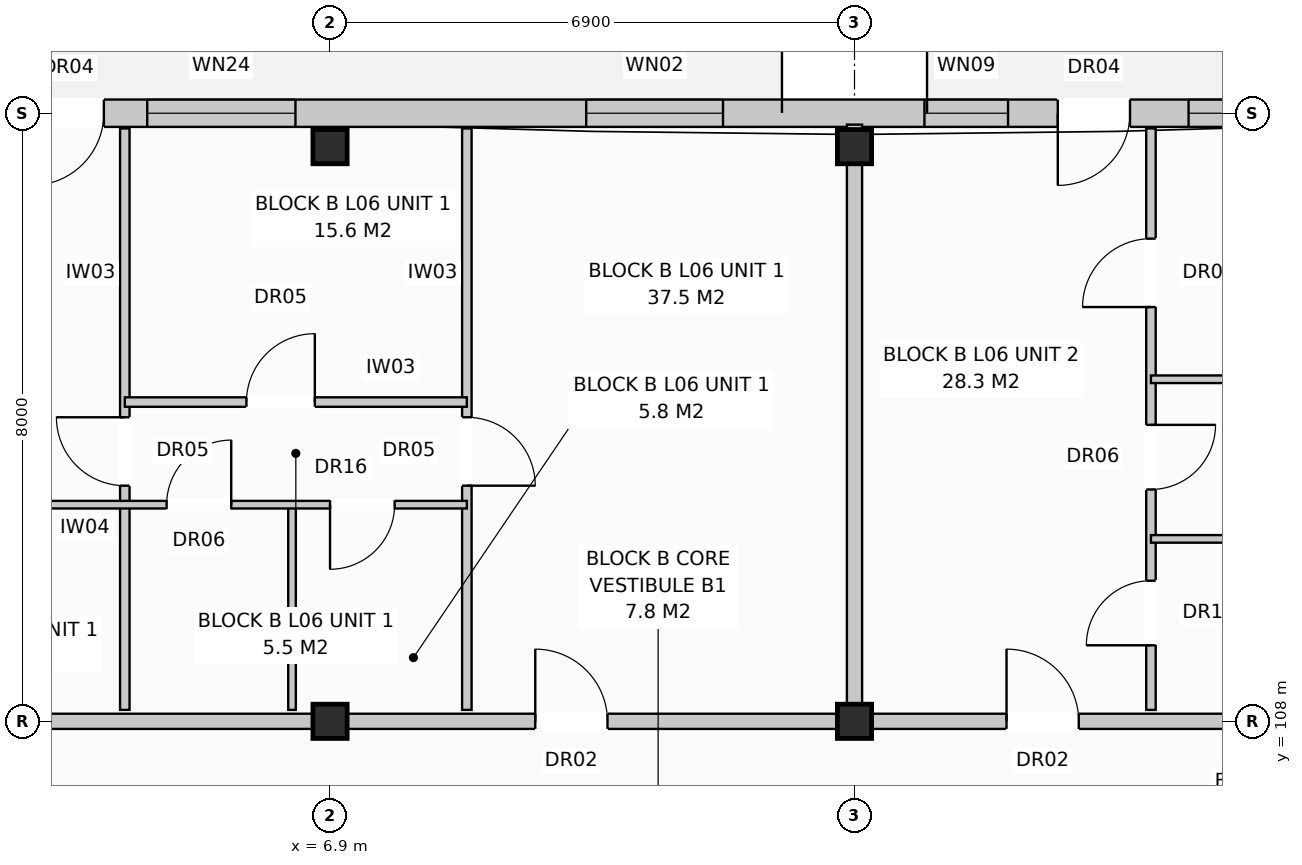
"""IFC4 building model, lengths in metres.
Left out: names, types, materials, properties, quantities, classifications, styles, units other than length and angle.
Written with IfcOpenShell. Run it as: python <this file> out.ifc"""

import sys

from ifc_helpers import new_model, si_unit, direction, frame, frame_2d, origin, origin_with_axes, origin_2d, place, context, subcontext, project, spatial, rectangle, extrude, element, fill, save


model = new_model("IFC4")
c1 = context("Model", 3, precision=1e-05, world=origin(), true_north=direction((0.0, 1.0)))
c2 = subcontext(c1, "Body", "Model", "MODEL_VIEW")
j1 = project(units=[si_unit("LENGTHUNIT", "METRE"), si_unit("PLANEANGLEUNIT", "RADIAN")], contexts=[c1])
p1 = place(None, origin())
s1 = spatial("IfcSite", under=j1, at=p1, CompositionType="ELEMENT")
p2 = place(p1, origin())
s2 = spatial("IfcBuilding", under=s1, at=p2, CompositionType="ELEMENT")
p3 = place(p2, frame((0.0, 0.0, 20.8)))
s3 = spatial("IfcBuildingStorey", under=s2, at=p3, CompositionType="ELEMENT", Elevation=20.8)
for number, where, z_axis, x_axis in (
    (1, (6.9, 108.0, 0.0), (0.0, 0.0, 1.0), (1.0, 0.0, 0.0)),
    (2, (6.9, 115.56, 0.0), (0.0, 0.0, 1.0), (1.0, 0.0, 0.0)),
    (3, (13.8, 108.0, 0.0), (0.0, 0.0, 1.0), (1.0, 0.0, 0.0)),
    (4, (13.8, 115.56, 0.0), (0.0, 0.0, 1.0), (1.0, 0.0, 0.0)),
):
    element("IfcColumn", number, at=place(p3, frame(where, z_axis=z_axis, x_axis=x_axis)), inside=s3, PredefinedType="COLUMN", context=c2, shape_type="SweptSolid", body=[
        extrude(rectangle(XDim=0.45, YDim=0.45, at=origin_2d()), origin(), (0.0, 0.0, 1.0), 3.2),
    ])
p4 = place(p3, frame((0.17, 116.0, 0.0), z_axis=(0.0, 0.0, 1.0), x_axis=(1.0, 0.0, 0.0)))
e5 = element("IfcWall", 5, at=p4, inside=s3, PredefinedType="STANDARD", context=c2, shape_type="SweptSolid", body=[
    extrude(rectangle(XDim=54.86, YDim=0.36, at=frame_2d((27.43, 0.0))), origin(), (0.0, 0.0, 1.0), 2.95),
])
p5 = place(p4, frame((2.804, 0.0, 0.0)))
e6 = element("IfcOpeningElement", 6, at=p5, cuts=e5, PredefinedType="OPENING", context=c2, shape_type="SweptSolid", body=[
    extrude(rectangle(XDim=0.95, YDim=2.1, at=frame_2d((0.475, 1.05))), frame((0.0, 0.192, 0.0), z_axis=(0.0, -1.0, 0.0), x_axis=(1.0, 0.0, 0.0)), (0.0, 0.0, 1.0), 0.384),
])
p6 = place(p4, frame((16.304, 0.0, 0.0)))
e7 = element("IfcOpeningElement", 7, at=p6, cuts=e5, PredefinedType="OPENING", context=c2, shape_type="SweptSolid", body=[
    extrude(rectangle(XDim=0.95, YDim=2.1, at=frame_2d((0.475, 1.05))), frame((0.0, 0.192, 0.0), z_axis=(0.0, -1.0, 0.0), x_axis=(1.0, 0.0, 0.0)), (0.0, 0.0, 1.0), 0.384),
])
p7 = place(p4, frame((30.804, 0.0, 0.0)))
e8 = element("IfcOpeningElement", 8, at=p7, cuts=e5, PredefinedType="OPENING", context=c2, shape_type="SweptSolid", body=[
    extrude(rectangle(XDim=0.95, YDim=2.1, at=frame_2d((0.475, 1.05))), frame((0.0, 0.192, 0.0), z_axis=(0.0, -1.0, 0.0), x_axis=(1.0, 0.0, 0.0)), (0.0, 0.0, 1.0), 0.384),
])
p8 = place(p4, frame((48.8, 0.0, 0.0)))
e9 = element("IfcOpeningElement", 9, at=p8, cuts=e5, PredefinedType="OPENING", context=c2, shape_type="SweptSolid", body=[
    extrude(rectangle(XDim=0.95, YDim=2.1, at=frame_2d((0.475, 1.05))), frame((0.0, 0.192, 0.0), z_axis=(0.0, -1.0, 0.0), x_axis=(1.0, 0.0, 0.0)), (0.0, 0.0, 1.0), 0.384),
])
p9 = place(p4, frame((0.65, 0.0, 0.8)))
e10 = element("IfcOpeningElement", 10, at=p9, cuts=e5, PredefinedType="OPENING", context=c2, shape_type="SweptSolid", body=[
    extrude(rectangle(XDim=1.9, YDim=1.85, at=frame_2d((0.95, 0.925))), frame((0.0, 0.192, 0.0), z_axis=(0.0, -1.0, 0.0), x_axis=(1.0, 0.0, 0.0)), (0.0, 0.0, 1.0), 0.384),
])
p10 = place(p4, frame((4.325, 0.0, 0.8)))
e11 = element("IfcOpeningElement", 11, at=p10, cuts=e5, PredefinedType="OPENING", context=c2, shape_type="SweptSolid", body=[
    extrude(rectangle(XDim=1.95, YDim=1.65, at=frame_2d((0.975, 0.825))), frame((0.0, 0.192, 0.0), z_axis=(0.0, -1.0, 0.0), x_axis=(1.0, 0.0, 0.0)), (0.0, 0.0, 1.0), 0.384),
])
p11 = place(p4, frame((10.1, 0.0, 0.8)))
e12 = element("IfcOpeningElement", 12, at=p11, cuts=e5, PredefinedType="OPENING", context=c2, shape_type="SweptSolid", body=[
    extrude(rectangle(XDim=1.8, YDim=1.7, at=frame_2d((0.9, 0.85))), frame((0.0, 0.192, 0.0), z_axis=(0.0, -1.0, 0.0), x_axis=(1.0, 0.0, 0.0)), (0.0, 0.0, 1.0), 0.384),
])
p12 = place(p4, frame((14.55, 0.0, 0.72)))
e13 = element("IfcOpeningElement", 13, at=p12, cuts=e5, PredefinedType="OPENING", context=c2, shape_type="SweptSolid", body=[
    extrude(rectangle(XDim=1.1, YDim=1.5, at=frame_2d((0.55, 0.75))), frame((0.0, 0.192, 0.0), z_axis=(0.0, -1.0, 0.0), x_axis=(1.0, 0.0, 0.0)), (0.0, 0.0, 1.0), 0.384),
])
p13 = place(p4, frame((18.025, 0.0, 0.8)))
e14 = element("IfcOpeningElement", 14, at=p13, cuts=e5, PredefinedType="OPENING", context=c2, shape_type="SweptSolid", body=[
    extrude(rectangle(XDim=1.95, YDim=1.65, at=frame_2d((0.975, 0.825))), frame((0.0, 0.192, 0.0), z_axis=(0.0, -1.0, 0.0), x_axis=(1.0, 0.0, 0.0)), (0.0, 0.0, 1.0), 0.384),
])
p14 = place(p4, frame((22.8, 0.0, 0.8)))
e15 = element("IfcOpeningElement", 15, at=p14, cuts=e5, PredefinedType="OPENING", context=c2, shape_type="SweptSolid", body=[
    extrude(rectangle(XDim=1.8, YDim=1.7, at=frame_2d((0.9, 0.85))), frame((0.0, 0.192, 0.0), z_axis=(0.0, -1.0, 0.0), x_axis=(1.0, 0.0, 0.0)), (0.0, 0.0, 1.0), 0.384),
])
p15 = place(p4, frame((28.85, 0.0, 0.72)))
e16 = element("IfcOpeningElement", 16, at=p15, cuts=e5, PredefinedType="OPENING", context=c2, shape_type="SweptSolid", body=[
    extrude(rectangle(XDim=1.1, YDim=1.5, at=frame_2d((0.55, 0.75))), frame((0.0, 0.192, 0.0), z_axis=(0.0, -1.0, 0.0), x_axis=(1.0, 0.0, 0.0)), (0.0, 0.0, 1.0), 0.384),
])
p16 = place(p4, frame((34.825, 0.0, 0.8)))
e17 = element("IfcOpeningElement", 17, at=p16, cuts=e5, PredefinedType="OPENING", context=c2, shape_type="SweptSolid", body=[
    extrude(rectangle(XDim=1.95, YDim=1.65, at=frame_2d((0.975, 0.825))), frame((0.0, 0.192, 0.0), z_axis=(0.0, -1.0, 0.0), x_axis=(1.0, 0.0, 0.0)), (0.0, 0.0, 1.0), 0.384),
])
p17 = place(p4, frame((38.3, 0.0, 0.8)))
e18 = element("IfcOpeningElement", 18, at=p17, cuts=e5, PredefinedType="OPENING", context=c2, shape_type="SweptSolid", body=[
    extrude(rectangle(XDim=1.8, YDim=1.7, at=frame_2d((0.9, 0.85))), frame((0.0, 0.192, 0.0), z_axis=(0.0, -1.0, 0.0), x_axis=(1.0, 0.0, 0.0)), (0.0, 0.0, 1.0), 0.384),
])
p18 = place(p4, frame((42.95, 0.0, 0.8)))
e19 = element("IfcOpeningElement", 19, at=p18, cuts=e5, PredefinedType="OPENING", context=c2, shape_type="SweptSolid", body=[
    extrude(rectangle(XDim=1.9, YDim=1.85, at=frame_2d((0.95, 0.925))), frame((0.0, 0.192, 0.0), z_axis=(0.0, -1.0, 0.0), x_axis=(1.0, 0.0, 0.0)), (0.0, 0.0, 1.0), 0.384),
])
p19 = place(p4, frame((51.825, 0.0, 0.8)))
e20 = element("IfcOpeningElement", 20, at=p19, cuts=e5, PredefinedType="OPENING", context=c2, shape_type="SweptSolid", body=[
    extrude(rectangle(XDim=1.95, YDim=1.65, at=frame_2d((0.975, 0.825))), frame((0.0, 0.192, 0.0), z_axis=(0.0, -1.0, 0.0), x_axis=(1.0, 0.0, 0.0)), (0.0, 0.0, 1.0), 0.384),
])
p20 = place(p3, frame((13.8, 108.15, 0.0), z_axis=(0.0, 0.0, 1.0), x_axis=(0.0, 1.0, 0.0)))
e21 = element("IfcWall", 21, at=p20, inside=s3, PredefinedType="PARTITIONING", context=c2, shape_type="SweptSolid", body=[
    extrude(rectangle(XDim=7.7, YDim=0.2, at=frame_2d((3.85, 0.0))), origin(), (0.0, 0.0, 1.0), 2.95),
])
p21 = place(p3, frame((0.0, 108.0, 0.0), z_axis=(0.0, 0.0, 1.0), x_axis=(1.0, 0.0, 0.0)))
e22 = element("IfcWall", 22, at=p21, inside=s3, PredefinedType="PARTITIONING", context=c2, shape_type="SweptSolid", body=[
    extrude(rectangle(XDim=13.8, YDim=0.2, at=frame_2d((6.9, 0.0))), origin(), (0.0, 0.0, 1.0), 2.39),
])
p22 = place(p21, frame((9.6, 0.0, 0.0)))
e23 = element("IfcOpeningElement", 23, at=p22, cuts=e22, PredefinedType="OPENING", context=c2, shape_type="SweptSolid", body=[
    extrude(rectangle(XDim=0.95, YDim=2.15, at=frame_2d((0.475, 1.075))), frame((0.0, 0.112, 0.0), z_axis=(0.0, -1.0, 0.0), x_axis=(1.0, 0.0, 0.0)), (0.0, 0.0, 1.0), 0.224),
])
p23 = place(p3, frame((8.7, 108.15, 0.0), z_axis=(0.0, 0.0, 1.0), x_axis=(0.0, 1.0, 0.0)))
e24 = element("IfcWall", 24, at=p23, inside=s3, PredefinedType="PARTITIONING", context=c2, shape_type="SweptSolid", body=[
    extrude(rectangle(XDim=7.65, YDim=0.125, at=frame_2d((3.825, 0.0))), origin(), (0.0, 0.0, 1.0), 2.95),
])
p24 = place(p23, frame((2.95, 0.0, 0.0)))
e25 = element("IfcOpeningElement", 25, at=p24, cuts=e24, PredefinedType="OPENING", context=c2, shape_type="SweptSolid", body=[
    extrude(rectangle(XDim=0.9, YDim=2.1, at=frame_2d((0.45, 1.05))), frame((0.0, 0.074, 0.0), z_axis=(0.0, -1.0, 0.0), x_axis=(1.0, 0.0, 0.0)), (0.0, 0.0, 1.0), 0.149),
])
p25 = place(p3, frame((4.2, 108.15, 0.0), z_axis=(0.0, 0.0, 1.0), x_axis=(0.0, 1.0, 0.0)))
e26 = element("IfcWall", 26, at=p25, inside=s3, PredefinedType="PARTITIONING", context=c2, shape_type="SweptSolid", body=[
    extrude(rectangle(XDim=7.65, YDim=0.125, at=frame_2d((3.825, 0.0))), origin(), (0.0, 0.0, 1.0), 2.95),
])
p26 = place(p25, frame((2.95, 0.0, 0.0)))
e27 = element("IfcOpeningElement", 27, at=p26, cuts=e26, PredefinedType="OPENING", context=c2, shape_type="SweptSolid", body=[
    extrude(rectangle(XDim=0.9, YDim=2.1, at=frame_2d((0.45, 1.05))), frame((0.0, 0.074, 0.0), z_axis=(0.0, -1.0, 0.0), x_axis=(1.0, 0.0, 0.0)), (0.0, 0.0, 1.0), 0.149),
])
p27 = place(p3, frame((6.4, 108.15, 0.0), z_axis=(0.0, 0.0, 1.0), x_axis=(0.0, 1.0, 0.0)))
e28 = element("IfcWall", 28, at=p27, inside=s3, PredefinedType="PARTITIONING", context=c2, shape_type="SweptSolid", body=[
    extrude(rectangle(XDim=2.7, YDim=0.1, at=frame_2d((1.35, 0.0))), origin(), (0.0, 0.0, 1.0), 2.95),
])
p28 = place(p3, frame((0.1, 110.85, 0.0), z_axis=(0.0, 0.0, 1.0), x_axis=(1.0, 0.0, 0.0)))
e29 = element("IfcWall", 29, at=p28, inside=s3, PredefinedType="PARTITIONING", context=c2, shape_type="SweptSolid", body=[
    extrude(rectangle(XDim=8.6, YDim=0.1, at=frame_2d((4.3, 0.0))), origin(), (0.0, 0.0, 1.0), 2.95),
])
p29 = place(p28, frame((1.4, 0.0, 0.0)))
e30 = element("IfcOpeningElement", 30, at=p29, cuts=e29, PredefinedType="OPENING", context=c2, shape_type="SweptSolid", body=[
    extrude(rectangle(XDim=0.85, YDim=2.05, at=frame_2d((0.425, 1.025))), frame((0.0, 0.062, 0.0), z_axis=(0.0, -1.0, 0.0), x_axis=(1.0, 0.0, 0.0)), (0.0, 0.0, 1.0), 0.124),
])
p30 = place(p28, frame((4.65, 0.0, 0.0)))
e31 = element("IfcOpeningElement", 31, at=p30, cuts=e29, PredefinedType="OPENING", context=c2, shape_type="SweptSolid", body=[
    extrude(rectangle(XDim=0.85, YDim=2.05, at=frame_2d((0.425, 1.025))), frame((0.0, 0.062, 0.0), z_axis=(0.0, -1.0, 0.0), x_axis=(1.0, 0.0, 0.0)), (0.0, 0.0, 1.0), 0.124),
])
p31 = place(p28, frame((6.8, 0.0, 0.0)))
e32 = element("IfcOpeningElement", 32, at=p31, cuts=e29, PredefinedType="OPENING", context=c2, shape_type="SweptSolid", body=[
    extrude(rectangle(XDim=0.85, YDim=2.1, at=frame_2d((0.425, 1.05))), frame((0.0, 0.062, 0.0), z_axis=(0.0, -1.0, 0.0), x_axis=(1.0, 0.0, 0.0)), (0.0, 0.0, 1.0), 0.124),
])
p32 = place(p3, frame((4.2, 112.2, 0.0), z_axis=(0.0, 0.0, 1.0), x_axis=(1.0, 0.0, 0.0)))
e33 = element("IfcWall", 33, at=p32, inside=s3, PredefinedType="PARTITIONING", context=c2, shape_type="SweptSolid", body=[
    extrude(rectangle(XDim=4.5, YDim=0.125, at=frame_2d((2.25, 0.0))), origin(), (0.0, 0.0, 1.0), 2.95),
])
p33 = place(p32, frame((1.6, 0.0, 0.0)))
e34 = element("IfcOpeningElement", 34, at=p33, cuts=e33, PredefinedType="OPENING", context=c2, shape_type="SweptSolid", body=[
    extrude(rectangle(XDim=0.9, YDim=2.1, at=frame_2d((0.45, 1.05))), frame((0.0, 0.074, 0.0), z_axis=(0.0, -1.0, 0.0), x_axis=(1.0, 0.0, 0.0)), (0.0, 0.0, 1.0), 0.149),
])
p34 = place(p3, frame((13.8, 108.0, 0.0), z_axis=(0.0, 0.0, 1.0), x_axis=(1.0, 0.0, 0.0)))
e35 = element("IfcWall", 35, at=p34, inside=s3, PredefinedType="PARTITIONING", context=c2, shape_type="SweptSolid", body=[
    extrude(rectangle(XDim=6.9, YDim=0.2, at=frame_2d((3.45, 0.0))), origin(), (0.0, 0.0, 1.0), 2.39),
])
p35 = place(p34, frame((2.0, 0.0, 0.0)))
e36 = element("IfcOpeningElement", 36, at=p35, cuts=e35, PredefinedType="OPENING", context=c2, shape_type="SweptSolid", body=[
    extrude(rectangle(XDim=0.95, YDim=2.15, at=frame_2d((0.475, 1.075))), frame((0.0, 0.112, 0.0), z_axis=(0.0, -1.0, 0.0), x_axis=(1.0, 0.0, 0.0)), (0.0, 0.0, 1.0), 0.224),
])
p36 = place(p3, frame((17.7, 108.15, 0.0), z_axis=(0.0, 0.0, 1.0), x_axis=(0.0, 1.0, 0.0)))
e37 = element("IfcWall", 37, at=p36, inside=s3, PredefinedType="PARTITIONING", context=c2, shape_type="SweptSolid", body=[
    extrude(rectangle(XDim=7.65, YDim=0.125, at=frame_2d((3.825, 0.0))), origin(), (0.0, 0.0, 1.0), 2.95),
])
p37 = place(p36, frame((0.85, 0.0, 0.0)))
e38 = element("IfcOpeningElement", 38, at=p37, cuts=e37, PredefinedType="OPENING", context=c2, shape_type="SweptSolid", body=[
    extrude(rectangle(XDim=0.85, YDim=2.1, at=frame_2d((0.425, 1.05))), frame((0.0, 0.074, 0.0), z_axis=(0.0, -1.0, 0.0), x_axis=(1.0, 0.0, 0.0)), (0.0, 0.0, 1.0), 0.149),
])
p38 = place(p36, frame((2.9, 0.0, 0.0)))
e39 = element("IfcOpeningElement", 39, at=p38, cuts=e37, PredefinedType="OPENING", context=c2, shape_type="SweptSolid", body=[
    extrude(rectangle(XDim=0.85, YDim=2.05, at=frame_2d((0.425, 1.025))), frame((0.0, 0.074, 0.0), z_axis=(0.0, -1.0, 0.0), x_axis=(1.0, 0.0, 0.0)), (0.0, 0.0, 1.0), 0.149),
])
p39 = place(p36, frame((5.3, 0.0, 0.0)))
e40 = element("IfcOpeningElement", 40, at=p39, cuts=e37, PredefinedType="OPENING", context=c2, shape_type="SweptSolid", body=[
    extrude(rectangle(XDim=0.9, YDim=2.1, at=frame_2d((0.45, 1.05))), frame((0.0, 0.074, 0.0), z_axis=(0.0, -1.0, 0.0), x_axis=(1.0, 0.0, 0.0)), (0.0, 0.0, 1.0), 0.149),
])
for number, where, z_axis, x_axis in (
    (41, (17.7, 110.4, 0.0), (0.0, 0.0, 1.0), (1.0, 0.0, 0.0)),
    (42, (17.7, 112.5, 0.0), (0.0, 0.0, 1.0), (1.0, 0.0, 0.0)),
):
    element("IfcWall", number, at=place(p3, frame(where, z_axis=z_axis, x_axis=x_axis)), inside=s3, PredefinedType="PARTITIONING", context=c2, shape_type="SweptSolid", body=[
        extrude(rectangle(XDim=2.9, YDim=0.1, at=frame_2d((1.45, 0.0))), origin(), (0.0, 0.0, 1.0), 2.95),
    ])
p40 = place(p5, frame((0.95, 0.0, 0.0), z_axis=(0.0, 0.0, 1.0), x_axis=(-1.0, 0.0, 0.0)))
e43 = element("IfcDoor", 43, at=p40, inside=s3, OperationType="SINGLE_SWING_LEFT", PredefinedType="DOOR", context=c2, shape_type="SweptSolid", body=[
    extrude(rectangle(XDim=0.95, YDim=2.1, at=frame_2d((0.475, 1.05))), frame((0.0, 0.025, 0.0), z_axis=(0.0, -1.0, 0.0), x_axis=(1.0, 0.0, 0.0)), (0.0, 0.0, 1.0), 0.05),
])
fill(e6, e43)
p41 = place(p6, frame((0.95, 0.0, 0.0), z_axis=(0.0, 0.0, 1.0), x_axis=(-1.0, 0.0, 0.0)))
e44 = element("IfcDoor", 44, at=p41, inside=s3, OperationType="SINGLE_SWING_LEFT", PredefinedType="DOOR", context=c2, shape_type="SweptSolid", body=[
    extrude(rectangle(XDim=0.95, YDim=2.1, at=frame_2d((0.475, 1.05))), frame((0.0, 0.025, 0.0), z_axis=(0.0, -1.0, 0.0), x_axis=(1.0, 0.0, 0.0)), (0.0, 0.0, 1.0), 0.05),
])
fill(e7, e44)
p42 = place(p10, origin_with_axes())
e45 = element("IfcWindow", 45, at=p42, inside=s3, PartitioningType="SINGLE_PANEL", PredefinedType="WINDOW", context=c2, shape_type="SweptSolid", body=[
    extrude(rectangle(XDim=1.95, YDim=1.65, at=frame_2d((0.975, 0.825))), frame((0.0, 0.03, 0.0), z_axis=(0.0, -1.0, 0.0), x_axis=(1.0, 0.0, 0.0)), (0.0, 0.0, 1.0), 0.06),
])
fill(e11, e45)
p43 = place(p11, origin_with_axes())
e46 = element("IfcWindow", 46, at=p43, inside=s3, PartitioningType="SINGLE_PANEL", PredefinedType="WINDOW", context=c2, shape_type="SweptSolid", body=[
    extrude(rectangle(XDim=1.8, YDim=1.7, at=frame_2d((0.9, 0.85))), frame((0.0, 0.03, 0.0), z_axis=(0.0, -1.0, 0.0), x_axis=(1.0, 0.0, 0.0)), (0.0, 0.0, 1.0), 0.06),
])
fill(e12, e46)
p44 = place(p12, origin_with_axes())
e47 = element("IfcWindow", 47, at=p44, inside=s3, PartitioningType="SINGLE_PANEL", PredefinedType="WINDOW", context=c2, shape_type="SweptSolid", body=[
    extrude(rectangle(XDim=1.1, YDim=1.5, at=frame_2d((0.55, 0.75))), frame((0.0, 0.03, 0.0), z_axis=(0.0, -1.0, 0.0), x_axis=(1.0, 0.0, 0.0)), (0.0, 0.0, 1.0), 0.06),
])
fill(e13, e47)
p45 = place(p13, origin_with_axes())
e48 = element("IfcWindow", 48, at=p45, inside=s3, PartitioningType="SINGLE_PANEL", PredefinedType="WINDOW", context=c2, shape_type="SweptSolid", body=[
    extrude(rectangle(XDim=1.95, YDim=1.65, at=frame_2d((0.975, 0.825))), frame((0.0, 0.03, 0.0), z_axis=(0.0, -1.0, 0.0), x_axis=(1.0, 0.0, 0.0)), (0.0, 0.0, 1.0), 0.06),
])
fill(e14, e48)
p46 = place(p22, origin_with_axes())
e49 = element("IfcDoor", 49, at=p46, inside=s3, OperationType="SINGLE_SWING_LEFT", PredefinedType="DOOR", context=c2, shape_type="SweptSolid", body=[
    extrude(rectangle(XDim=0.95, YDim=2.15, at=frame_2d((0.475, 1.075))), frame((0.0, 0.025, 0.0), z_axis=(0.0, -1.0, 0.0), x_axis=(1.0, 0.0, 0.0)), (0.0, 0.0, 1.0), 0.05),
])
fill(e23, e49)
p47 = place(p24, frame((0.9, 0.0, 0.0), z_axis=(0.0, 0.0, 1.0), x_axis=(-1.0, 0.0, 0.0)))
e50 = element("IfcDoor", 50, at=p47, inside=s3, OperationType="SINGLE_SWING_LEFT", PredefinedType="DOOR", context=c2, shape_type="SweptSolid", body=[
    extrude(rectangle(XDim=0.9, YDim=2.1, at=frame_2d((0.45, 1.05))), frame((0.0, 0.025, 0.0), z_axis=(0.0, -1.0, 0.0), x_axis=(1.0, 0.0, 0.0)), (0.0, 0.0, 1.0), 0.05),
])
fill(e25, e50)
p48 = place(p26, origin_with_axes())
e51 = element("IfcDoor", 51, at=p48, inside=s3, OperationType="SINGLE_SWING_RIGHT", PredefinedType="DOOR", context=c2, shape_type="SweptSolid", body=[
    extrude(rectangle(XDim=0.9, YDim=2.1, at=frame_2d((0.45, 1.05))), frame((0.0, 0.025, 0.0), z_axis=(0.0, -1.0, 0.0), x_axis=(1.0, 0.0, 0.0)), (0.0, 0.0, 1.0), 0.05),
])
fill(e27, e51)
p49 = place(p30, origin_with_axes())
e52 = element("IfcDoor", 52, at=p49, inside=s3, OperationType="SINGLE_SWING_RIGHT", PredefinedType="DOOR", context=c2, shape_type="SweptSolid", body=[
    extrude(rectangle(XDim=0.85, YDim=2.05, at=frame_2d((0.425, 1.025))), frame((0.0, 0.025, 0.0), z_axis=(0.0, -1.0, 0.0), x_axis=(1.0, 0.0, 0.0)), (0.0, 0.0, 1.0), 0.05),
])
fill(e31, e52)
p50 = place(p31, frame((0.85, 0.0, 0.0), z_axis=(0.0, 0.0, 1.0), x_axis=(-1.0, 0.0, 0.0)))
e53 = element("IfcDoor", 53, at=p50, inside=s3, OperationType="SINGLE_SWING_LEFT", PredefinedType="DOOR", context=c2, shape_type="SweptSolid", body=[
    extrude(rectangle(XDim=0.85, YDim=2.1, at=frame_2d((0.425, 1.05))), frame((0.0, 0.025, 0.0), z_axis=(0.0, -1.0, 0.0), x_axis=(1.0, 0.0, 0.0)), (0.0, 0.0, 1.0), 0.05),
])
fill(e32, e53)
p51 = place(p33, origin_with_axes())
e54 = element("IfcDoor", 54, at=p51, inside=s3, OperationType="SINGLE_SWING_RIGHT", PredefinedType="DOOR", context=c2, shape_type="SweptSolid", body=[
    extrude(rectangle(XDim=0.9, YDim=2.1, at=frame_2d((0.45, 1.05))), frame((0.0, 0.025, 0.0), z_axis=(0.0, -1.0, 0.0), x_axis=(1.0, 0.0, 0.0)), (0.0, 0.0, 1.0), 0.05),
])
fill(e34, e54)
p52 = place(p35, origin_with_axes())
e55 = element("IfcDoor", 55, at=p52, inside=s3, OperationType="SINGLE_SWING_LEFT", PredefinedType="DOOR", context=c2, shape_type="SweptSolid", body=[
    extrude(rectangle(XDim=0.95, YDim=2.15, at=frame_2d((0.475, 1.075))), frame((0.0, 0.025, 0.0), z_axis=(0.0, -1.0, 0.0), x_axis=(1.0, 0.0, 0.0)), (0.0, 0.0, 1.0), 0.05),
])
fill(e36, e55)
p53 = place(p37, origin_with_axes())
e56 = element("IfcDoor", 56, at=p53, inside=s3, OperationType="SINGLE_SWING_LEFT", PredefinedType="DOOR", context=c2, shape_type="SweptSolid", body=[
    extrude(rectangle(XDim=0.85, YDim=2.1, at=frame_2d((0.425, 1.05))), frame((0.0, 0.025, 0.0), z_axis=(0.0, -1.0, 0.0), x_axis=(1.0, 0.0, 0.0)), (0.0, 0.0, 1.0), 0.05),
])
fill(e38, e56)
p54 = place(p38, frame((0.85, 0.0, 0.0), z_axis=(0.0, 0.0, 1.0), x_axis=(-1.0, 0.0, 0.0)))
e57 = element("IfcDoor", 57, at=p54, inside=s3, OperationType="SINGLE_SWING_RIGHT", PredefinedType="DOOR", context=c2, shape_type="SweptSolid", body=[
    extrude(rectangle(XDim=0.85, YDim=2.05, at=frame_2d((0.425, 1.025))), frame((0.0, 0.025, 0.0), z_axis=(0.0, -1.0, 0.0), x_axis=(1.0, 0.0, 0.0)), (0.0, 0.0, 1.0), 0.05),
])
fill(e39, e57)
p55 = place(p39, origin_with_axes())
e58 = element("IfcDoor", 58, at=p55, inside=s3, OperationType="SINGLE_SWING_LEFT", PredefinedType="DOOR", context=c2, shape_type="SweptSolid", body=[
    extrude(rectangle(XDim=0.9, YDim=2.1, at=frame_2d((0.45, 1.05))), frame((0.0, 0.025, 0.0), z_axis=(0.0, -1.0, 0.0), x_axis=(1.0, 0.0, 0.0)), (0.0, 0.0, 1.0), 0.05),
])
fill(e40, e58)
save(model, sys.argv[1])
